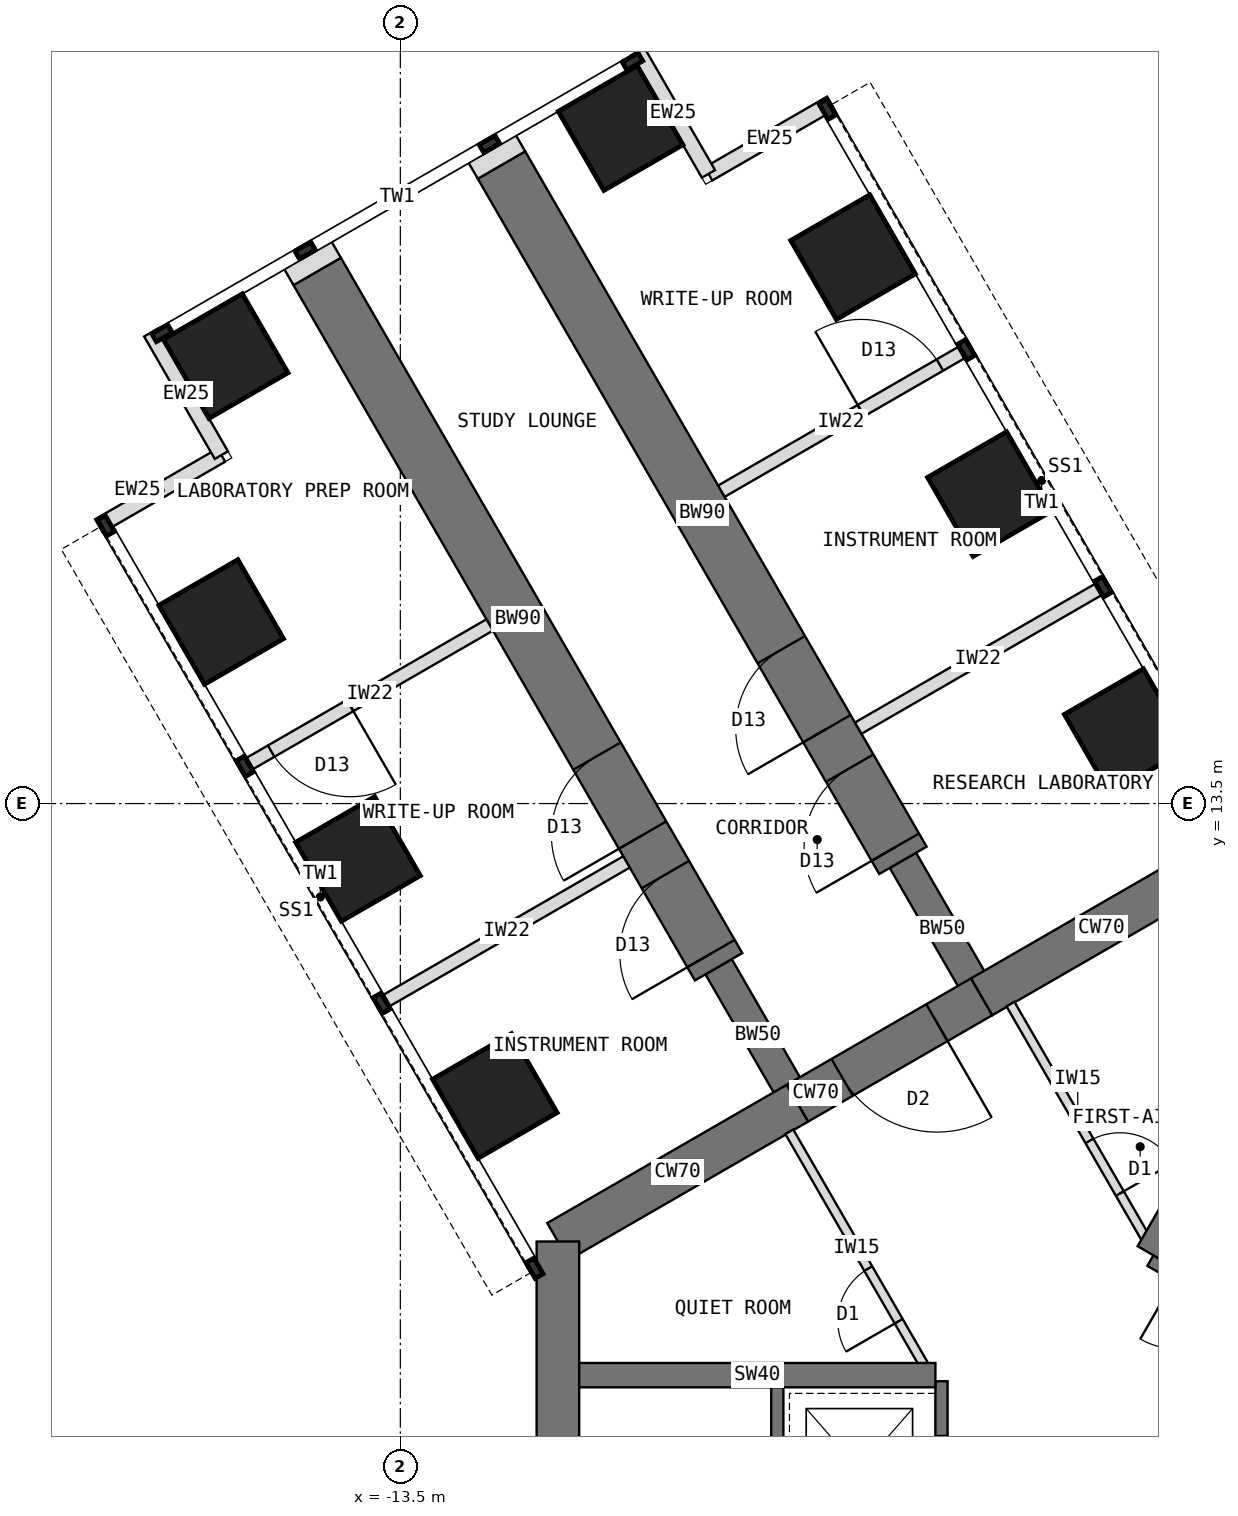
"""IFC4 building model, lengths in metres.
Left out: names, types, materials, properties, quantities, classifications, styles, units other than length and angle.
Written with IfcOpenShell. Run it as: python <this file> out.ifc"""

import sys

from ifc_helpers import new_model, si_unit, direction, frame, frame_2d, origin, origin_2d, place, context, subcontext, project, spatial, rectangle, extrude, element, fill, save


model = new_model("IFC4")
c1 = context("Model", 3, precision=1e-05, world=origin(), true_north=direction((0.0, 1.0)))
c2 = subcontext(c1, "Body", "Model", "MODEL_VIEW")
j1 = project(units=[si_unit("LENGTHUNIT", "METRE"), si_unit("PLANEANGLEUNIT", "RADIAN")], contexts=[c1])
p1 = place(None, origin())
s1 = spatial("IfcSite", under=j1, at=p1, CompositionType="ELEMENT")
p2 = place(p1, origin())
s2 = spatial("IfcBuilding", under=s1, at=p2, CompositionType="ELEMENT")
p3 = place(p2, frame((0.0, 0.0, 36.5)))
s3 = spatial("IfcBuildingStorey", under=s2, at=p3, CompositionType="ELEMENT", Elevation=36.5)
p4 = place(p3, frame((0.0, 12.596, 0.0), z_axis=(0.0, 0.0, 1.0), x_axis=(-0.866011268655, -0.500024481964, 0.0)))
e1 = element("IfcWall", 1, at=p4, inside=s3, PredefinedType="SHEAR", context=c2, shape_type="SweptSolid", body=[
    extrude(rectangle(XDim=4.548, YDim=0.7, at=frame_2d((2.274, 0.0))), origin(), (0.0, 0.0, 1.0), 4.0),
])
p5 = place(p3, frame((-3.939, 10.322, 0.0), z_axis=(0.0, 0.0, 1.0), x_axis=(-0.866019471182, -0.500010275428, 0.0)))
e2 = element("IfcWall", 2, at=p5, inside=s3, PredefinedType="SHEAR", context=c2, shape_type="SweptSolid", body=[
    extrude(rectangle(XDim=3.5, YDim=0.7, at=frame_2d((1.75, 0.0))), origin(), (0.0, 0.0, 1.0), 4.0),
])
p6 = place(p5, frame((0.85, 0.0, 0.0)))
e3 = element("IfcOpeningElement", 3, at=p6, cuts=e2, PredefinedType="OPENING", context=c2, shape_type="SweptSolid", body=[
    extrude(rectangle(XDim=1.8, YDim=2.1, at=frame_2d((0.9, 1.05))), frame((0.0, 0.36, 0.0), z_axis=(0.0, -1.0, 0.0), x_axis=(1.0, 0.0, 0.0)), (0.0, 0.0, 1.0), 0.72),
])
p7 = place(p3, frame((-6.97, 8.572, 0.0), z_axis=(0.0, 0.0, 1.0), x_axis=(-0.866034513004, -0.499984222037, 0.0)))
e4 = element("IfcWall", 4, at=p7, inside=s3, PredefinedType="SHEAR", context=c2, shape_type="SweptSolid", body=[
    extrude(rectangle(XDim=4.548, YDim=0.7, at=frame_2d((2.274, 0.0))), origin(), (0.0, 0.0, 1.0), 4.0),
])
p8 = place(p3, frame((-10.908, 6.298, 0.0), z_axis=(0.0, 0.0, 1.0), x_axis=(0.0, -1.0, 0.0)))
e5 = element("IfcWall", 5, at=p8, inside=s3, PredefinedType="SHEAR", context=c2, shape_type="SweptSolid", body=[
    extrude(rectangle(XDim=12.596, YDim=0.7, at=frame_2d((6.298, 0.0))), origin(), (0.0, 0.0, 1.0), 4.0),
])
p9 = place(p3, frame((-6.97, 8.572, 0.0), z_axis=(0.0, 0.0, 1.0), x_axis=(-0.499988811324, 0.866031863473, 0.0)))
e6 = element("IfcWall", 6, at=p9, inside=s3, PredefinedType="SHEAR", context=c2, shape_type="SweptSolid", body=[
    extrude(rectangle(XDim=2.592, YDim=0.5, at=frame_2d((1.296, 0.0))), origin(), (0.0, 0.0, 1.0), 4.0),
])
p10 = place(p3, frame((-8.266, 10.816, 0.0), z_axis=(0.0, 0.0, 1.0), x_axis=(-0.499996231654, 0.866027579429, 0.0)))
e7 = element("IfcWall", 7, at=p10, inside=s3, PredefinedType="SHEAR", context=c2, shape_type="SweptSolid", body=[
    extrude(rectangle(XDim=13.2, YDim=0.9, at=frame_2d((6.6, 0.0))), origin(), (0.0, 0.0, 1.0), 4.0),
])
p11 = place(p10, frame((0.25, 0.0, 0.0)))
e8 = element("IfcOpeningElement", 8, at=p11, cuts=e7, PredefinedType="OPENING", context=c2, shape_type="SweptSolid", body=[
    extrude(rectangle(XDim=1.5, YDim=2.1, at=frame_2d((0.75, 1.05))), frame((0.0, 0.46, 0.0), z_axis=(0.0, -1.0, 0.0), x_axis=(1.0, 0.0, 0.0)), (0.0, 0.0, 1.0), 0.92),
])
p12 = place(p10, frame((2.5, 0.0, 0.0)))
e9 = element("IfcOpeningElement", 9, at=p12, cuts=e7, PredefinedType="OPENING", context=c2, shape_type="SweptSolid", body=[
    extrude(rectangle(XDim=1.5, YDim=2.1, at=frame_2d((0.75, 1.05))), frame((0.0, 0.46, 0.0), z_axis=(0.0, -1.0, 0.0), x_axis=(1.0, 0.0, 0.0)), (0.0, 0.0, 1.0), 0.92),
])
p13 = place(p3, frame((-3.939, 10.322, 0.0), z_axis=(0.0, 0.0, 1.0), x_axis=(-0.499918158782, 0.866072649678, 0.0)))
e10 = element("IfcWall", 10, at=p13, inside=s3, PredefinedType="SHEAR", context=c2, shape_type="SweptSolid", body=[
    extrude(rectangle(XDim=2.592, YDim=0.5, at=frame_2d((1.296, 0.0))), origin(), (0.0, 0.0, 1.0), 4.0),
])
p14 = place(p3, frame((-5.234, 12.566, 0.0), z_axis=(0.0, 0.0, 1.0), x_axis=(-0.500010103361, 0.866019570528, 0.0)))
e11 = element("IfcWall", 11, at=p14, inside=s3, PredefinedType="SHEAR", context=c2, shape_type="SweptSolid", body=[
    extrude(rectangle(XDim=13.2, YDim=0.9, at=frame_2d((6.6, 0.0))), origin(), (0.0, 0.0, 1.0), 4.0),
])
p15 = place(p14, frame((0.25, 0.0, 0.0)))
e12 = element("IfcOpeningElement", 12, at=p15, cuts=e11, PredefinedType="OPENING", context=c2, shape_type="SweptSolid", body=[
    extrude(rectangle(XDim=1.5, YDim=2.1, at=frame_2d((0.75, 1.05))), frame((0.0, 0.46, 0.0), z_axis=(0.0, -1.0, 0.0), x_axis=(1.0, 0.0, 0.0)), (0.0, 0.0, 1.0), 0.92),
])
p16 = place(p14, frame((2.5, 0.0, 0.0)))
e13 = element("IfcOpeningElement", 13, at=p16, cuts=e11, PredefinedType="OPENING", context=c2, shape_type="SweptSolid", body=[
    extrude(rectangle(XDim=1.5, YDim=2.1, at=frame_2d((0.75, 1.05))), frame((0.0, 0.46, 0.0), z_axis=(0.0, -1.0, 0.0), x_axis=(1.0, 0.0, 0.0)), (0.0, 0.0, 1.0), 0.92),
])
for number, where, z_axis, x_axis in (
    (14, (-11.946, 8.691, 0.0), (0.0, 0.0, 1.0), (0.866, 0.5, 0.0)),
    (15, (-1.554, 14.691, 0.0), (0.0, 0.0, 1.0), (0.866, 0.5, 0.0)),
    (16, (-14.196, 12.588, 0.0), (0.0, 0.0, 1.0), (0.866, 0.5, 0.0)),
    (17, (-3.804, 18.588, 0.0), (0.0, 0.0, 1.0), (0.866, 0.5, 0.0)),
    (18, (-16.446, 16.486, 0.0), (0.0, 0.0, 1.0), (0.866, 0.5, 0.0)),
    (19, (-6.054, 22.486, 0.0), (0.0, 0.0, 1.0), (0.866, 0.5, 0.0)),
    (20, (-16.373, 20.858, 0.0), (0.0, 0.0, 1.0), (0.866, 0.5, 0.0)),
    (21, (-9.877, 24.608, 0.0), (0.0, 0.0, 1.0), (0.866, 0.5, 0.0)),
):
    element("IfcColumn", number, at=place(p3, frame(where, z_axis=z_axis, x_axis=x_axis)), inside=s3, PredefinedType="COLUMN", context=c2, shape_type="SweptSolid", body=[
        extrude(rectangle(XDim=1.5, YDim=1.5, at=origin_2d()), origin(), (0.0, 0.0, 1.0), 4.0),
    ])
for number, where, z_axis, x_axis in (
    (22, (-18.456, 18.067, 0.0), (0.0, 0.0, 1.0), (0.866, 0.5, 0.0)),
    (23, (-16.443, 19.23, 0.0), (0.0, 0.0, 1.0), (-0.5, 0.866, 0.0)),
    (24, (-6.419, 25.017, 0.0), (0.0, 0.0, 1.0), (-0.866, -0.5, 0.0)),
    (25, (-8.432, 23.855, 0.0), (0.0, 0.0, 1.0), (-0.5, 0.866, 0.0)),
):
    element("IfcWall", number, at=place(p3, frame(where, z_axis=z_axis, x_axis=x_axis)), inside=s3, PredefinedType="STANDARD", context=c2, shape_type="SweptSolid", body=[
        extrude(rectangle(XDim=2.325, YDim=0.25, at=frame_2d((1.163, 0.0))), origin(), (0.0, 0.0, 1.0), 3.8),
    ])
for number, where, z_axis, x_axis in (
    (26, (-14.865, 22.248, 0.0), (0.0, 0.0, 1.0), (-0.5, 0.866, 0.0)),
    (27, (-11.834, 23.998, 0.0), (0.0, 0.0, 1.0), (-0.5, 0.866, 0.0)),
):
    element("IfcWall", number, at=place(p3, frame(where, z_axis=z_axis, x_axis=x_axis)), inside=s3, PredefinedType="PARTITIONING", context=c2, shape_type="SweptSolid", body=[
        extrude(rectangle(XDim=0.31, YDim=0.9, at=frame_2d((0.155, 0.0))), origin(), (0.0, 0.0, 1.0), 3.8),
    ])
p17 = place(p3, frame((5.764, 1.984, 0.0), z_axis=(0.0, 0.0, 1.0), x_axis=(-0.866026010844, 0.49999894854, 0.0)))
e28 = element("IfcWall", 28, at=p17, inside=s3, PredefinedType="SHEAR", context=c2, shape_type="SweptSolid", body=[
    extrude(rectangle(XDim=8.0, YDim=0.2, at=frame_2d((4.0, 0.0))), origin(), (0.0, 0.0, 1.0), 4.0),
])
p18 = place(p17, frame((6.3, 0.0, 0.0)))
e29 = element("IfcOpeningElement", 29, at=p18, cuts=e28, PredefinedType="OPENING", context=c2, shape_type="SweptSolid", body=[
    extrude(rectangle(XDim=1.2, YDim=2.1, at=frame_2d((0.6, 1.05))), frame((0.0, 0.11, 0.0), z_axis=(0.0, -1.0, 0.0), x_axis=(1.0, 0.0, 0.0)), (0.0, 0.0, 1.0), 0.22),
])
p19 = place(p3, frame((-1.201, 6.12, 0.0), z_axis=(0.0, 0.0, 1.0), x_axis=(0.500002627198, 0.866023886965, 0.0)))
e30 = element("IfcWall", 30, at=p19, inside=s3, PredefinedType="SHEAR", context=c2, shape_type="SweptSolid", body=[
    extrude(rectangle(XDim=5.858, YDim=0.4, at=frame_2d((2.929, 0.0))), origin(), (0.0, 0.0, 1.0), 4.0),
])
p20 = place(p3, frame((-4.6, 4.0, 0.0), z_axis=(0.0, 0.0, 1.0), x_axis=(0.0, -1.0, 0.0)))
e31 = element("IfcWall", 31, at=p20, inside=s3, PredefinedType="SHEAR", context=c2, shape_type="SweptSolid", body=[
    extrude(rectangle(XDim=8.0, YDim=0.2, at=frame_2d((4.0, 0.0))), origin(), (0.0, 0.0, 1.0), 4.0),
])
p21 = place(p20, frame((6.3, 0.0, 0.0)))
e32 = element("IfcOpeningElement", 32, at=p21, cuts=e31, PredefinedType="OPENING", context=c2, shape_type="SweptSolid", body=[
    extrude(rectangle(XDim=1.2, YDim=2.1, at=frame_2d((0.6, 1.05))), frame((0.0, 0.11, 0.0), z_axis=(0.0, -1.0, 0.0), x_axis=(1.0, 0.0, 0.0)), (0.0, 0.0, 1.0), 0.22),
])
p22 = place(p20, frame((0.9, 0.0, 0.0)))
e33 = element("IfcOpeningElement", 33, at=p22, cuts=e31, PredefinedType="OPENING", context=c2, shape_type="SweptSolid", body=[
    extrude(rectangle(XDim=1.1, YDim=2.2, at=frame_2d((0.55, 1.1))), frame((0.0, 0.11, 0.0), z_axis=(0.0, -1.0, 0.0), x_axis=(1.0, 0.0, 0.0)), (0.0, 0.0, 1.0), 0.22),
])
p23 = place(p3, frame((-7.3, 4.0, 0.0), z_axis=(0.0, 0.0, 1.0), x_axis=(0.0, -1.0, 0.0)))
e34 = element("IfcWall", 34, at=p23, inside=s3, PredefinedType="SHEAR", context=c2, shape_type="SweptSolid", body=[
    extrude(rectangle(XDim=8.0, YDim=0.2, at=frame_2d((4.0, 0.0))), origin(), (0.0, 0.0, 1.0), 4.0),
])
p24 = place(p23, frame((6.7, 0.0, 0.0)))
e35 = element("IfcOpeningElement", 35, at=p24, cuts=e34, PredefinedType="OPENING", context=c2, shape_type="SweptSolid", body=[
    extrude(rectangle(XDim=1.1, YDim=2.1, at=frame_2d((0.55, 1.05))), frame((0.0, 0.11, 0.0), z_axis=(0.0, -1.0, 0.0), x_axis=(1.0, 0.0, 0.0)), (0.0, 0.0, 1.0), 0.22),
])
p25 = place(p3, frame((-4.7, 4.1, 0.0), z_axis=(0.0, 0.0, 1.0), x_axis=(-1.0, 0.0, 0.0)))
e36 = element("IfcWall", 36, at=p25, inside=s3, PredefinedType="SHEAR", context=c2, shape_type="SweptSolid", body=[
    extrude(rectangle(XDim=5.858, YDim=0.4, at=frame_2d((2.929, 0.0))), origin(), (0.0, 0.0, 1.0), 4.0),
])
p26 = place(p3, frame((-9.78, 12.54, 0.0), z_axis=(0.0, 0.0, 1.0), x_axis=(-0.866035472144, -0.499982560684, 0.0)))
e37 = element("IfcWall", 37, at=p26, inside=s3, PredefinedType="PARTITIONING", context=c2, shape_type="SweptSolid", body=[
    extrude(rectangle(XDim=4.55, YDim=0.215, at=frame_2d((2.275, 0.0))), origin(), (0.0, 0.0, 1.0), 3.8),
])
p27 = place(p3, frame((-12.03, 16.437, 0.0), z_axis=(0.0, 0.0, 1.0), x_axis=(-0.866035472144, -0.499982560684, 0.0)))
e38 = element("IfcWall", 38, at=p27, inside=s3, PredefinedType="PARTITIONING", context=c2, shape_type="SweptSolid", body=[
    extrude(rectangle(XDim=4.55, YDim=0.215, at=frame_2d((2.275, 0.0))), origin(), (0.0, 0.0, 1.0), 3.8),
])
p28 = place(p27, frame((2.65, 0.0, 0.0)))
e39 = element("IfcOpeningElement", 39, at=p28, cuts=e38, PredefinedType="OPENING", context=c2, shape_type="SweptSolid", body=[
    extrude(rectangle(XDim=1.5, YDim=2.1, at=frame_2d((0.75, 1.05))), frame((0.0, 0.117, 0.0), z_axis=(0.0, -1.0, 0.0), x_axis=(1.0, 0.0, 0.0)), (0.0, 0.0, 1.0), 0.235),
])
p29 = place(p3, frame((-5.97, 14.74, 0.0), z_axis=(0.0, 0.0, 1.0), x_axis=(0.866035472144, 0.499982560684, 0.0)))
e40 = element("IfcWall", 40, at=p29, inside=s3, PredefinedType="PARTITIONING", context=c2, shape_type="SweptSolid", body=[
    extrude(rectangle(XDim=4.55, YDim=0.215, at=frame_2d((2.275, 0.0))), origin(), (0.0, 0.0, 1.0), 3.8),
])
p30 = place(p3, frame((-8.22, 18.637, 0.0), z_axis=(0.0, 0.0, 1.0), x_axis=(0.866012237902, 0.500022803284, 0.0)))
e41 = element("IfcWall", 41, at=p30, inside=s3, PredefinedType="PARTITIONING", context=c2, shape_type="SweptSolid", body=[
    extrude(rectangle(XDim=4.55, YDim=0.215, at=frame_2d((2.275, 0.0))), origin(), (0.0, 0.0, 1.0), 3.8),
])
p31 = place(p30, frame((2.65, 0.0, 0.0)))
e42 = element("IfcOpeningElement", 42, at=p31, cuts=e41, PredefinedType="OPENING", context=c2, shape_type="SweptSolid", body=[
    extrude(rectangle(XDim=1.5, YDim=2.1, at=frame_2d((0.75, 1.05))), frame((0.0, 0.117, 0.0), z_axis=(0.0, -1.0, 0.0), x_axis=(1.0, 0.0, 0.0)), (0.0, 0.0, 1.0), 0.235),
])
p32 = place(p3, frame((-4.89, 4.27, 0.0), z_axis=(0.0, 0.0, 1.0), x_axis=(-0.500007369519, 0.866021148949, 0.0)))
e43 = element("IfcWall", 43, at=p32, inside=s3, PredefinedType="PARTITIONING", context=c2, shape_type="SweptSolid", body=[
    extrude(rectangle(XDim=4.426, YDim=0.15, at=frame_2d((2.213, 0.0))), origin(), (0.0, 0.0, 1.0), 3.8),
])
p33 = place(p32, frame((0.828, 0.0, 0.0)))
e44 = element("IfcOpeningElement", 44, at=p33, cuts=e43, PredefinedType="OPENING", context=c2, shape_type="SweptSolid", body=[
    extrude(rectangle(XDim=1.0, YDim=2.1, at=frame_2d((0.5, 1.05))), frame((0.0, 0.085, 0.0), z_axis=(0.0, -1.0, 0.0), x_axis=(1.0, 0.0, 0.0)), (0.0, 0.0, 1.0), 0.17),
])
p34 = place(p3, frame((-3.466, 10.202, 0.0), z_axis=(0.0, 0.0, 1.0), x_axis=(0.500007369519, -0.866021148949, 0.0)))
e45 = element("IfcWall", 45, at=p34, inside=s3, PredefinedType="PARTITIONING", context=c2, shape_type="SweptSolid", body=[
    extrude(rectangle(XDim=4.426, YDim=0.15, at=frame_2d((2.213, 0.0))), origin(), (0.0, 0.0, 1.0), 3.8),
])
p35 = place(p34, frame((2.598, 0.0, 0.0)))
e46 = element("IfcOpeningElement", 46, at=p35, cuts=e45, PredefinedType="OPENING", context=c2, shape_type="SweptSolid", body=[
    extrude(rectangle(XDim=1.0, YDim=2.1, at=frame_2d((0.5, 1.05))), frame((0.0, 0.085, 0.0), z_axis=(0.0, -1.0, 0.0), x_axis=(1.0, 0.0, 0.0)), (0.0, 0.0, 1.0), 0.17),
])
p36 = place(p6, origin())
e47 = element("IfcDoor", 47, at=p36, inside=s3, OperationType="DOUBLE_DOOR_DOUBLE_SWING", PredefinedType="DOOR", context=c2, shape_type="SweptSolid", body=[
    extrude(rectangle(XDim=1.72, YDim=2.06, at=frame_2d((0.9, 1.03))), frame((0.0, 0.025, 0.0), z_axis=(0.0, -1.0, 0.0), x_axis=(1.0, 0.0, 0.0)), (0.0, 0.0, 1.0), 0.05),
    extrude(rectangle(XDim=0.04, YDim=2.1, at=frame_2d((0.02, 1.05))), frame((0.0, 0.35, 0.0), z_axis=(0.0, -1.0, 0.0), x_axis=(1.0, 0.0, 0.0)), (0.0, 0.0, 1.0), 0.699),
    extrude(rectangle(XDim=0.04, YDim=2.1, at=frame_2d((1.78, 1.05))), frame((0.0, 0.35, 0.0), z_axis=(0.0, -1.0, 0.0), x_axis=(1.0, 0.0, 0.0)), (0.0, 0.0, 1.0), 0.699),
    extrude(rectangle(XDim=1.72, YDim=0.04, at=frame_2d((0.9, 2.08))), frame((0.0, 0.35, 0.0), z_axis=(0.0, -1.0, 0.0), x_axis=(1.0, 0.0, 0.0)), (0.0, 0.0, 1.0), 0.699),
])
fill(e3, e47)
p37 = place(p28, origin())
e48 = element("IfcDoor", 48, at=p37, inside=s3, OperationType="DOUBLE_DOOR_SINGLE_SWING", PredefinedType="DOOR", context=c2, shape_type="SweptSolid", body=[
    extrude(rectangle(XDim=1.5, YDim=2.1, at=frame_2d((0.75, 1.05))), frame((0.0, 0.025, 0.0), z_axis=(0.0, -1.0, 0.0), x_axis=(1.0, 0.0, 0.0)), (0.0, 0.0, 1.0), 0.05),
])
fill(e39, e48)
p38 = place(p31, origin())
e49 = element("IfcDoor", 49, at=p38, inside=s3, OperationType="DOUBLE_DOOR_SINGLE_SWING", PredefinedType="DOOR", context=c2, shape_type="SweptSolid", body=[
    extrude(rectangle(XDim=1.5, YDim=2.1, at=frame_2d((0.75, 1.05))), frame((0.0, 0.025, 0.0), z_axis=(0.0, -1.0, 0.0), x_axis=(1.0, 0.0, 0.0)), (0.0, 0.0, 1.0), 0.05),
])
fill(e42, e49)
p39 = place(p35, origin())
e50 = element("IfcDoor", 50, at=p39, inside=s3, OperationType="SINGLE_SWING_RIGHT", PredefinedType="DOOR", context=c2, shape_type="SweptSolid", body=[
    extrude(rectangle(XDim=1.0, YDim=2.1, at=frame_2d((0.5, 1.05))), frame((0.0, 0.025, 0.0), z_axis=(0.0, -1.0, 0.0), x_axis=(1.0, 0.0, 0.0)), (0.0, 0.0, 1.0), 0.05),
])
fill(e46, e50)
p40 = place(p33, origin())
e51 = element("IfcDoor", 51, at=p40, inside=s3, OperationType="SINGLE_SWING_LEFT", PredefinedType="DOOR", context=c2, shape_type="SweptSolid", body=[
    extrude(rectangle(XDim=1.0, YDim=2.1, at=frame_2d((0.5, 1.05))), frame((0.0, 0.025, 0.0), z_axis=(0.0, -1.0, 0.0), x_axis=(1.0, 0.0, 0.0)), (0.0, 0.0, 1.0), 0.05),
])
fill(e44, e51)
p41 = place(p11, origin())
e52 = element("IfcDoor", 52, at=p41, inside=s3, OperationType="DOUBLE_DOOR_SINGLE_SWING", PredefinedType="DOOR", context=c2, shape_type="SweptSolid", body=[
    extrude(rectangle(XDim=1.42, YDim=2.06, at=frame_2d((0.75, 1.03))), frame((0.0, 0.025, 0.0), z_axis=(0.0, -1.0, 0.0), x_axis=(1.0, 0.0, 0.0)), (0.0, 0.0, 1.0), 0.05),
    extrude(rectangle(XDim=0.04, YDim=2.1, at=frame_2d((0.02, 1.05))), frame((0.0, 0.45, 0.0), z_axis=(0.0, -1.0, 0.0), x_axis=(1.0, 0.0, 0.0)), (0.0, 0.0, 1.0), 0.899),
    extrude(rectangle(XDim=0.04, YDim=2.1, at=frame_2d((1.48, 1.05))), frame((0.0, 0.45, 0.0), z_axis=(0.0, -1.0, 0.0), x_axis=(1.0, 0.0, 0.0)), (0.0, 0.0, 1.0), 0.899),
    extrude(rectangle(XDim=1.42, YDim=0.04, at=frame_2d((0.75, 2.08))), frame((0.0, 0.45, 0.0), z_axis=(0.0, -1.0, 0.0), x_axis=(1.0, 0.0, 0.0)), (0.0, 0.0, 1.0), 0.899),
])
fill(e8, e52)
p42 = place(p12, origin())
e53 = element("IfcDoor", 53, at=p42, inside=s3, OperationType="DOUBLE_DOOR_SINGLE_SWING", PredefinedType="DOOR", context=c2, shape_type="SweptSolid", body=[
    extrude(rectangle(XDim=1.42, YDim=2.06, at=frame_2d((0.75, 1.03))), frame((0.0, 0.025, 0.0), z_axis=(0.0, -1.0, 0.0), x_axis=(1.0, 0.0, 0.0)), (0.0, 0.0, 1.0), 0.05),
    extrude(rectangle(XDim=0.04, YDim=2.1, at=frame_2d((0.02, 1.05))), frame((0.0, 0.45, 0.0), z_axis=(0.0, -1.0, 0.0), x_axis=(1.0, 0.0, 0.0)), (0.0, 0.0, 1.0), 0.899),
    extrude(rectangle(XDim=0.04, YDim=2.1, at=frame_2d((1.48, 1.05))), frame((0.0, 0.45, 0.0), z_axis=(0.0, -1.0, 0.0), x_axis=(1.0, 0.0, 0.0)), (0.0, 0.0, 1.0), 0.899),
    extrude(rectangle(XDim=1.42, YDim=0.04, at=frame_2d((0.75, 2.08))), frame((0.0, 0.45, 0.0), z_axis=(0.0, -1.0, 0.0), x_axis=(1.0, 0.0, 0.0)), (0.0, 0.0, 1.0), 0.899),
])
fill(e9, e53)
p43 = place(p15, origin())
e54 = element("IfcDoor", 54, at=p43, inside=s3, OperationType="DOUBLE_DOOR_SINGLE_SWING", PredefinedType="DOOR", context=c2, shape_type="SweptSolid", body=[
    extrude(rectangle(XDim=1.42, YDim=2.06, at=frame_2d((0.75, 1.03))), frame((0.0, 0.025, 0.0), z_axis=(0.0, -1.0, 0.0), x_axis=(1.0, 0.0, 0.0)), (0.0, 0.0, 1.0), 0.05),
    extrude(rectangle(XDim=0.04, YDim=2.1, at=frame_2d((0.02, 1.05))), frame((0.0, 0.45, 0.0), z_axis=(0.0, -1.0, 0.0), x_axis=(1.0, 0.0, 0.0)), (0.0, 0.0, 1.0), 0.899),
    extrude(rectangle(XDim=0.04, YDim=2.1, at=frame_2d((1.48, 1.05))), frame((0.0, 0.45, 0.0), z_axis=(0.0, -1.0, 0.0), x_axis=(1.0, 0.0, 0.0)), (0.0, 0.0, 1.0), 0.899),
    extrude(rectangle(XDim=1.42, YDim=0.04, at=frame_2d((0.75, 2.08))), frame((0.0, 0.45, 0.0), z_axis=(0.0, -1.0, 0.0), x_axis=(1.0, 0.0, 0.0)), (0.0, 0.0, 1.0), 0.899),
])
fill(e12, e54)
p44 = place(p16, origin())
e55 = element("IfcDoor", 55, at=p44, inside=s3, OperationType="DOUBLE_DOOR_SINGLE_SWING", PredefinedType="DOOR", context=c2, shape_type="SweptSolid", body=[
    extrude(rectangle(XDim=1.42, YDim=2.06, at=frame_2d((0.75, 1.03))), frame((0.0, 0.025, 0.0), z_axis=(0.0, -1.0, 0.0), x_axis=(1.0, 0.0, 0.0)), (0.0, 0.0, 1.0), 0.05),
    extrude(rectangle(XDim=0.04, YDim=2.1, at=frame_2d((0.02, 1.05))), frame((0.0, 0.45, 0.0), z_axis=(0.0, -1.0, 0.0), x_axis=(1.0, 0.0, 0.0)), (0.0, 0.0, 1.0), 0.899),
    extrude(rectangle(XDim=0.04, YDim=2.1, at=frame_2d((1.48, 1.05))), frame((0.0, 0.45, 0.0), z_axis=(0.0, -1.0, 0.0), x_axis=(1.0, 0.0, 0.0)), (0.0, 0.0, 1.0), 0.899),
    extrude(rectangle(XDim=1.42, YDim=0.04, at=frame_2d((0.75, 2.08))), frame((0.0, 0.45, 0.0), z_axis=(0.0, -1.0, 0.0), x_axis=(1.0, 0.0, 0.0)), (0.0, 0.0, 1.0), 0.899),
])
fill(e13, e55)
save(model, sys.argv[1])
